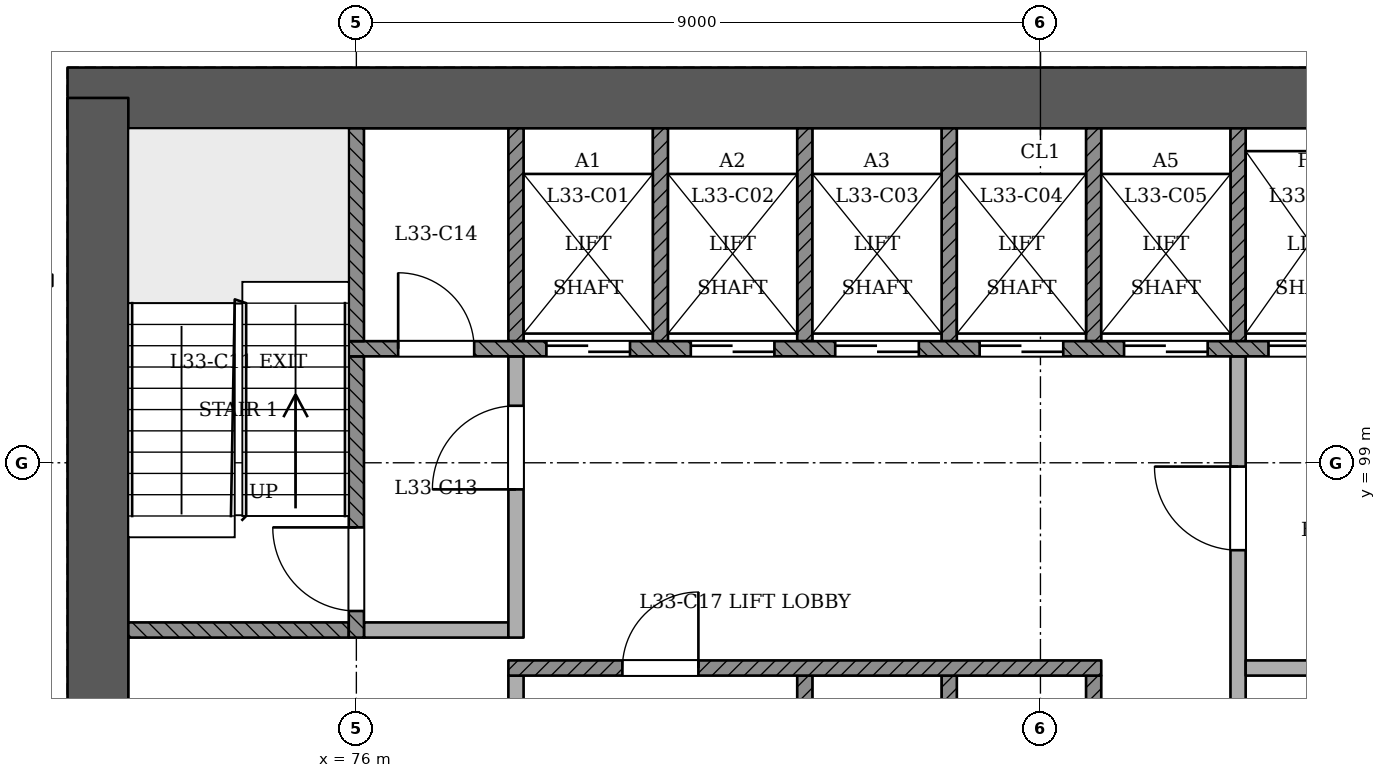
"""IFC4 building model, lengths in metres.
Left out: names, types, materials, properties, quantities, classifications, styles, units other than length and angle.
Written with IfcOpenShell. Run it as: python <this file> out.ifc"""

import sys

from ifc_helpers import new_model, si_unit, direction, frame, frame_2d, origin, place, context, subcontext, project, spatial, rectangle, extrude, element, fill, save


model = new_model("IFC4")
c1 = context("Model", 3, precision=1e-05, world=origin(), true_north=direction((0.0, 1.0)))
c2 = subcontext(c1, "Body", "Model", "MODEL_VIEW")
j1 = project(units=[si_unit("LENGTHUNIT", "METRE"), si_unit("PLANEANGLEUNIT", "RADIAN")], contexts=[c1])
p1 = place(None, origin())
s1 = spatial("IfcSite", under=j1, at=p1, CompositionType="ELEMENT")
p2 = place(p1, origin())
s2 = spatial("IfcBuilding", under=s1, at=p2, CompositionType="ELEMENT")
p3 = place(p2, frame((0.0, 0.0, 131.4)))
s3 = spatial("IfcBuildingStorey", under=s2, at=p3, CompositionType="ELEMENT", Elevation=131.4)
p4 = place(p3, frame((97.4, 103.8, 0.0), z_axis=(0.0, 0.0, 1.0), x_axis=(-1.0, 0.0, 0.0)))
e1 = element("IfcWall", 1, at=p4, inside=s3, PredefinedType="SHEAR", context=c2, shape_type="SweptSolid", body=[
    extrude(rectangle(XDim=25.2, YDim=0.8, at=frame_2d((12.6, 0.0))), origin(), (0.0, 0.0, 1.0), 3.6),
])
p5 = place(p3, frame((72.6, 103.8, 0.0), z_axis=(0.0, 0.0, 1.0), x_axis=(0.0, -1.0, 0.0)))
e2 = element("IfcWall", 2, at=p5, inside=s3, PredefinedType="SHEAR", context=c2, shape_type="SweptSolid", body=[
    extrude(rectangle(XDim=11.2, YDim=0.8, at=frame_2d((5.6, 0.0))), origin(), (0.0, 0.0, 1.0), 3.6),
])
p6 = place(p3, frame((64.656, 98.273, 0.0), z_axis=(0.0, 0.0, 1.0), x_axis=(0.500001784794, -0.866024373331, 0.0)))
e3 = element("IfcWall", 3, at=p6, inside=s3, PredefinedType="PARTITIONING", context=c2, shape_type="SweptSolid", body=[
    extrude(rectangle(XDim=40.426, YDim=0.15, at=frame_2d((20.213, 0.0))), origin(), (0.0, 0.0, 1.0), 2.75),
])
p7 = place(p6, frame((0.2, 0.0, 0.0)))
e4 = element("IfcOpeningElement", 4, at=p7, cuts=e3, PredefinedType="OPENING", context=c2, shape_type="SweptSolid", body=[
    extrude(rectangle(XDim=1.2, YDim=2.1, at=frame_2d((0.6, 1.05))), frame((0.0, 0.085, 0.0), z_axis=(0.0, -1.0, 0.0), x_axis=(1.0, 0.0, 0.0)), (0.0, 0.0, 1.0), 0.171),
])
p8 = place(p6, frame((2.933, 0.0, 0.0)))
e5 = element("IfcOpeningElement", 5, at=p8, cuts=e3, PredefinedType="OPENING", context=c2, shape_type="SweptSolid", body=[
    extrude(rectangle(XDim=1.0, YDim=2.1, at=frame_2d((0.5, 1.05))), frame((0.0, 0.085, 0.0), z_axis=(0.0, -1.0, 0.0), x_axis=(1.0, 0.0, 0.0)), (0.0, 0.0, 1.0), 0.171),
])
p9 = place(p6, frame((9.608, 0.0, 0.0)))
e6 = element("IfcOpeningElement", 6, at=p9, cuts=e3, PredefinedType="OPENING", context=c2, shape_type="SweptSolid", body=[
    extrude(rectangle(XDim=1.0, YDim=2.1, at=frame_2d((0.5, 1.05))), frame((0.0, 0.085, 0.0), z_axis=(0.0, -1.0, 0.0), x_axis=(1.0, 0.0, 0.0)), (0.0, 0.0, 1.0), 0.171),
])
p10 = place(p6, frame((11.818, 0.0, 0.0)))
e7 = element("IfcOpeningElement", 7, at=p10, cuts=e3, PredefinedType="OPENING", context=c2, shape_type="SweptSolid", body=[
    extrude(rectangle(XDim=1.0, YDim=2.1, at=frame_2d((0.5, 1.05))), frame((0.0, 0.085, 0.0), z_axis=(0.0, -1.0, 0.0), x_axis=(1.0, 0.0, 0.0)), (0.0, 0.0, 1.0), 0.171),
])
p11 = place(p6, frame((18.493, 0.0, 0.0)))
e8 = element("IfcOpeningElement", 8, at=p11, cuts=e3, PredefinedType="OPENING", context=c2, shape_type="SweptSolid", body=[
    extrude(rectangle(XDim=1.0, YDim=2.1, at=frame_2d((0.5, 1.05))), frame((0.0, 0.085, 0.0), z_axis=(0.0, -1.0, 0.0), x_axis=(1.0, 0.0, 0.0)), (0.0, 0.0, 1.0), 0.171),
])
p12 = place(p6, frame((21.963, 0.0, 0.0)))
e9 = element("IfcOpeningElement", 9, at=p12, cuts=e3, PredefinedType="OPENING", context=c2, shape_type="SweptSolid", body=[
    extrude(rectangle(XDim=1.0, YDim=2.1, at=frame_2d((0.5, 1.05))), frame((0.0, 0.085, 0.0), z_axis=(0.0, -1.0, 0.0), x_axis=(1.0, 0.0, 0.0)), (0.0, 0.0, 1.0), 0.171),
])
p13 = place(p6, frame((27.493, 0.0, 0.0)))
e10 = element("IfcOpeningElement", 10, at=p13, cuts=e3, PredefinedType="OPENING", context=c2, shape_type="SweptSolid", body=[
    extrude(rectangle(XDim=1.0, YDim=2.1, at=frame_2d((0.5, 1.05))), frame((0.0, 0.085, 0.0), z_axis=(0.0, -1.0, 0.0), x_axis=(1.0, 0.0, 0.0)), (0.0, 0.0, 1.0), 0.171),
])
p14 = place(p6, frame((30.963, 0.0, 0.0)))
e11 = element("IfcOpeningElement", 11, at=p14, cuts=e3, PredefinedType="OPENING", context=c2, shape_type="SweptSolid", body=[
    extrude(rectangle(XDim=1.0, YDim=2.1, at=frame_2d((0.5, 1.05))), frame((0.0, 0.085, 0.0), z_axis=(0.0, -1.0, 0.0), x_axis=(1.0, 0.0, 0.0)), (0.0, 0.0, 1.0), 0.171),
])
p15 = place(p6, frame((36.493, 0.0, 0.0)))
e12 = element("IfcOpeningElement", 12, at=p15, cuts=e3, PredefinedType="OPENING", context=c2, shape_type="SweptSolid", body=[
    extrude(rectangle(XDim=1.0, YDim=2.1, at=frame_2d((0.5, 1.05))), frame((0.0, 0.085, 0.0), z_axis=(0.0, -1.0, 0.0), x_axis=(1.0, 0.0, 0.0)), (0.0, 0.0, 1.0), 0.171),
])
p16 = place(p6, frame((39.101, 0.0, 0.0)))
e13 = element("IfcOpeningElement", 13, at=p16, cuts=e3, PredefinedType="OPENING", context=c2, shape_type="SweptSolid", body=[
    extrude(rectangle(XDim=1.0, YDim=2.1, at=frame_2d((0.5, 1.05))), frame((0.0, 0.085, 0.0), z_axis=(0.0, -1.0, 0.0), x_axis=(1.0, 0.0, 0.0)), (0.0, 0.0, 1.0), 0.171),
])
p17 = place(p3, frame((78.1, 93.4, 0.0), z_axis=(0.0, 0.0, 1.0), x_axis=(0.0, 1.0, 0.0)))
e14 = element("IfcWall", 14, at=p17, inside=s3, PredefinedType="PARTITIONING", context=c2, shape_type="SweptSolid", body=[
    extrude(rectangle(XDim=2.8, YDim=0.2, at=frame_2d((1.4, 0.0))), origin(), (0.0, 0.0, 1.0), 3.15),
])
for number, where, z_axis, x_axis in (
    (15, (81.9, 93.4, 0.0), (0.0, 0.0, 1.0), (0.0, 1.0, 0.0)),
    (16, (83.8, 93.4, 0.0), (0.0, 0.0, 1.0), (0.0, 1.0, 0.0)),
    (17, (85.7, 93.4, 0.0), (0.0, 0.0, 1.0), (0.0, 1.0, 0.0)),
):
    element("IfcWall", number, at=place(p3, frame(where, z_axis=z_axis, x_axis=x_axis)), inside=s3, PredefinedType="SOLIDWALL", context=c2, shape_type="SweptSolid", body=[
        extrude(rectangle(XDim=2.8, YDim=0.2, at=frame_2d((1.4, 0.0))), origin(), (0.0, 0.0, 1.0), 3.15),
    ])
p18 = place(p3, frame((87.6, 93.4, 0.0), z_axis=(0.0, 0.0, 1.0), x_axis=(0.0, 1.0, 0.0)))
e18 = element("IfcWall", 18, at=p18, inside=s3, PredefinedType="PARTITIONING", context=c2, shape_type="SweptSolid", body=[
    extrude(rectangle(XDim=7.0, YDim=0.2, at=frame_2d((3.5, 0.0))), origin(), (0.0, 0.0, 1.0), 3.15),
])
p19 = place(p18, frame((4.45, 0.0, 0.0)))
e19 = element("IfcOpeningElement", 19, at=p19, cuts=e18, PredefinedType="OPENING", context=c2, shape_type="SweptSolid", body=[
    extrude(rectangle(XDim=1.1, YDim=2.1, at=frame_2d((0.55, 1.05))), frame((0.0, 0.11, 0.0), z_axis=(0.0, -1.0, 0.0), x_axis=(1.0, 0.0, 0.0)), (0.0, 0.0, 1.0), 0.221),
])
p20 = place(p3, frame((78.0, 96.3, 0.0), z_axis=(0.0, 0.0, 1.0), x_axis=(1.0, 0.0, 0.0)))
e20 = element("IfcWall", 20, at=p20, inside=s3, PredefinedType="SOLIDWALL", context=c2, shape_type="SweptSolid", body=[
    extrude(rectangle(XDim=7.8, YDim=0.2, at=frame_2d((3.9, 0.0))), origin(), (0.0, 0.0, 1.0), 3.15),
])
p21 = place(p20, frame((1.5, 0.0, 0.0)))
e21 = element("IfcOpeningElement", 21, at=p21, cuts=e20, PredefinedType="OPENING", context=c2, shape_type="SweptSolid", body=[
    extrude(rectangle(XDim=1.0, YDim=2.1, at=frame_2d((0.5, 1.05))), frame((0.0, 0.11, 0.0), z_axis=(0.0, -1.0, 0.0), x_axis=(1.0, 0.0, 0.0)), (0.0, 0.0, 1.0), 0.221),
])
p22 = place(p3, frame((87.7, 96.3, 0.0), z_axis=(0.0, 0.0, 1.0), x_axis=(1.0, 0.0, 0.0)))
e22 = element("IfcWall", 22, at=p22, inside=s3, PredefinedType="PARTITIONING", context=c2, shape_type="SweptSolid", body=[
    extrude(rectangle(XDim=3.6, YDim=0.2, at=frame_2d((1.8, 0.0))), origin(), (0.0, 0.0, 1.0), 3.15),
])
p23 = place(p3, frame((73.0, 96.8, 0.0), z_axis=(0.0, 0.0, 1.0), x_axis=(1.0, 0.0, 0.0)))
e23 = element("IfcWall", 23, at=p23, inside=s3, PredefinedType="SOLIDWALL", context=c2, shape_type="SweptSolid", body=[
    extrude(rectangle(XDim=2.9, YDim=0.2, at=frame_2d((1.45, 0.0))), origin(), (0.0, 0.0, 1.0), 3.15),
])
p24 = place(p3, frame((76.0, 96.7, 0.0), z_axis=(0.0, 0.0, 1.0), x_axis=(0.0, 1.0, 0.0)))
e24 = element("IfcWall", 24, at=p24, inside=s3, PredefinedType="SOLIDWALL", context=c2, shape_type="SweptSolid", body=[
    extrude(rectangle(XDim=3.7, YDim=0.2, at=frame_2d((1.85, 0.0))), origin(), (0.0, 0.0, 1.0), 3.15),
])
p25 = place(p24, frame((0.35, 0.0, 0.0)))
e25 = element("IfcOpeningElement", 25, at=p25, cuts=e24, PredefinedType="OPENING", context=c2, shape_type="SweptSolid", body=[
    extrude(rectangle(XDim=1.1, YDim=2.1, at=frame_2d((0.55, 1.05))), frame((0.0, 0.11, 0.0), z_axis=(0.0, -1.0, 0.0), x_axis=(1.0, 0.0, 0.0)), (0.0, 0.0, 1.0), 0.221),
])
p26 = place(p3, frame((76.1, 96.8, 0.0), z_axis=(0.0, 0.0, 1.0), x_axis=(1.0, 0.0, 0.0)))
e26 = element("IfcWall", 26, at=p26, inside=s3, PredefinedType="PARTITIONING", context=c2, shape_type="SweptSolid", body=[
    extrude(rectangle(XDim=1.9, YDim=0.2, at=frame_2d((0.95, 0.0))), origin(), (0.0, 0.0, 1.0), 3.15),
])
p27 = place(p3, frame((78.1, 96.7, 0.0), z_axis=(0.0, 0.0, 1.0), x_axis=(0.0, 1.0, 0.0)))
e27 = element("IfcWall", 27, at=p27, inside=s3, PredefinedType="PARTITIONING", context=c2, shape_type="SweptSolid", body=[
    extrude(rectangle(XDim=3.7, YDim=0.2, at=frame_2d((1.85, 0.0))), origin(), (0.0, 0.0, 1.0), 3.15),
])
p28 = place(p27, frame((1.95, 0.0, 0.0)))
e28 = element("IfcOpeningElement", 28, at=p28, cuts=e27, PredefinedType="OPENING", context=c2, shape_type="SweptSolid", body=[
    extrude(rectangle(XDim=1.1, YDim=2.1, at=frame_2d((0.55, 1.05))), frame((0.0, 0.11, 0.0), z_axis=(0.0, -1.0, 0.0), x_axis=(1.0, 0.0, 0.0)), (0.0, 0.0, 1.0), 0.221),
])
p29 = place(p3, frame((75.9, 100.5, 0.0), z_axis=(0.0, 0.0, 1.0), x_axis=(1.0, 0.0, 0.0)))
e29 = element("IfcWall", 29, at=p29, inside=s3, PredefinedType="SOLIDWALL", context=c2, shape_type="SweptSolid", body=[
    extrude(rectangle(XDim=18.2, YDim=0.2, at=frame_2d((9.1, 0.0))), origin(), (0.0, 0.0, 1.0), 3.15),
])
p30 = place(p29, frame((2.6, 0.0, 0.0)))
e30 = element("IfcOpeningElement", 30, at=p30, cuts=e29, PredefinedType="OPENING", context=c2, shape_type="SweptSolid", body=[
    extrude(rectangle(XDim=1.1, YDim=2.1, at=frame_2d((0.55, 1.05))), frame((0.0, 0.11, 0.0), z_axis=(0.0, -1.0, 0.0), x_axis=(1.0, 0.0, 0.0)), (0.0, 0.0, 1.0), 0.221),
])
p31 = place(p29, frame((4.5, 0.0, 0.0)))
e31 = element("IfcOpeningElement", 31, at=p31, cuts=e29, PredefinedType="OPENING", context=c2, shape_type="SweptSolid", body=[
    extrude(rectangle(XDim=1.1, YDim=2.1, at=frame_2d((0.55, 1.05))), frame((0.0, 0.11, 0.0), z_axis=(0.0, -1.0, 0.0), x_axis=(1.0, 0.0, 0.0)), (0.0, 0.0, 1.0), 0.221),
])
p32 = place(p29, frame((6.4, 0.0, 0.0)))
e32 = element("IfcOpeningElement", 32, at=p32, cuts=e29, PredefinedType="OPENING", context=c2, shape_type="SweptSolid", body=[
    extrude(rectangle(XDim=1.1, YDim=2.1, at=frame_2d((0.55, 1.05))), frame((0.0, 0.11, 0.0), z_axis=(0.0, -1.0, 0.0), x_axis=(1.0, 0.0, 0.0)), (0.0, 0.0, 1.0), 0.221),
])
p33 = place(p29, frame((8.3, 0.0, 0.0)))
e33 = element("IfcOpeningElement", 33, at=p33, cuts=e29, PredefinedType="OPENING", context=c2, shape_type="SweptSolid", body=[
    extrude(rectangle(XDim=1.1, YDim=2.1, at=frame_2d((0.55, 1.05))), frame((0.0, 0.11, 0.0), z_axis=(0.0, -1.0, 0.0), x_axis=(1.0, 0.0, 0.0)), (0.0, 0.0, 1.0), 0.221),
])
p34 = place(p29, frame((10.2, 0.0, 0.0)))
e34 = element("IfcOpeningElement", 34, at=p34, cuts=e29, PredefinedType="OPENING", context=c2, shape_type="SweptSolid", body=[
    extrude(rectangle(XDim=1.1, YDim=2.1, at=frame_2d((0.55, 1.05))), frame((0.0, 0.11, 0.0), z_axis=(0.0, -1.0, 0.0), x_axis=(1.0, 0.0, 0.0)), (0.0, 0.0, 1.0), 0.221),
])
p35 = place(p29, frame((12.1, 0.0, 0.0)))
e35 = element("IfcOpeningElement", 35, at=p35, cuts=e29, PredefinedType="OPENING", context=c2, shape_type="SweptSolid", body=[
    extrude(rectangle(XDim=1.1, YDim=2.1, at=frame_2d((0.55, 1.05))), frame((0.0, 0.11, 0.0), z_axis=(0.0, -1.0, 0.0), x_axis=(1.0, 0.0, 0.0)), (0.0, 0.0, 1.0), 0.221),
])
p36 = place(p29, frame((14.0, 0.0, 0.0)))
e36 = element("IfcOpeningElement", 36, at=p36, cuts=e29, PredefinedType="OPENING", context=c2, shape_type="SweptSolid", body=[
    extrude(rectangle(XDim=1.1, YDim=2.1, at=frame_2d((0.55, 1.05))), frame((0.0, 0.11, 0.0), z_axis=(0.0, -1.0, 0.0), x_axis=(1.0, 0.0, 0.0)), (0.0, 0.0, 1.0), 0.221),
])
p37 = place(p29, frame((0.65, 0.0, 0.0)))
e37 = element("IfcOpeningElement", 37, at=p37, cuts=e29, PredefinedType="OPENING", context=c2, shape_type="SweptSolid", body=[
    extrude(rectangle(XDim=1.0, YDim=2.1, at=frame_2d((0.5, 1.05))), frame((0.0, 0.11, 0.0), z_axis=(0.0, -1.0, 0.0), x_axis=(1.0, 0.0, 0.0)), (0.0, 0.0, 1.0), 0.221),
])
p38 = place(p29, frame((16.3, 0.0, 0.0)))
e38 = element("IfcOpeningElement", 38, at=p38, cuts=e29, PredefinedType="OPENING", context=c2, shape_type="SweptSolid", body=[
    extrude(rectangle(XDim=1.0, YDim=2.1, at=frame_2d((0.5, 1.05))), frame((0.0, 0.11, 0.0), z_axis=(0.0, -1.0, 0.0), x_axis=(1.0, 0.0, 0.0)), (0.0, 0.0, 1.0), 0.221),
])
for number, where, z_axis, x_axis in (
    (39, (76.0, 100.6, 0.0), (0.0, 0.0, 1.0), (0.0, 1.0, 0.0)),
    (40, (78.1, 100.6, 0.0), (0.0, 0.0, 1.0), (0.0, 1.0, 0.0)),
    (41, (80.0, 100.6, 0.0), (0.0, 0.0, 1.0), (0.0, 1.0, 0.0)),
    (42, (81.9, 100.6, 0.0), (0.0, 0.0, 1.0), (0.0, 1.0, 0.0)),
    (43, (83.8, 100.6, 0.0), (0.0, 0.0, 1.0), (0.0, 1.0, 0.0)),
    (44, (85.7, 100.6, 0.0), (0.0, 0.0, 1.0), (0.0, 1.0, 0.0)),
    (45, (87.6, 100.6, 0.0), (0.0, 0.0, 1.0), (0.0, 1.0, 0.0)),
):
    element("IfcWall", number, at=place(p3, frame(where, z_axis=z_axis, x_axis=x_axis)), inside=s3, PredefinedType="SOLIDWALL", context=c2, shape_type="SweptSolid", body=[
        extrude(rectangle(XDim=2.8, YDim=0.2, at=frame_2d((1.4, 0.0))), origin(), (0.0, 0.0, 1.0), 3.15),
    ])
p39 = place(p30, origin())
e46 = element("IfcDoor", 46, at=p39, inside=s3, OperationType="SLIDING_TO_RIGHT", PredefinedType="NOTDEFINED", context=c2, shape_type="SweptSolid", body=[
    extrude(rectangle(XDim=1.1, YDim=2.1, at=frame_2d((0.55, 1.05))), frame((0.0, 0.025, 0.0), z_axis=(0.0, -1.0, 0.0), x_axis=(1.0, 0.0, 0.0)), (0.0, 0.0, 1.0), 0.05),
])
fill(e30, e46)
p40 = place(p31, origin())
e47 = element("IfcDoor", 47, at=p40, inside=s3, OperationType="SLIDING_TO_LEFT", PredefinedType="NOTDEFINED", context=c2, shape_type="SweptSolid", body=[
    extrude(rectangle(XDim=1.1, YDim=2.1, at=frame_2d((0.55, 1.05))), frame((0.0, 0.025, 0.0), z_axis=(0.0, -1.0, 0.0), x_axis=(1.0, 0.0, 0.0)), (0.0, 0.0, 1.0), 0.05),
])
fill(e31, e47)
p41 = place(p32, origin())
e48 = element("IfcDoor", 48, at=p41, inside=s3, OperationType="SLIDING_TO_RIGHT", PredefinedType="NOTDEFINED", context=c2, shape_type="SweptSolid", body=[
    extrude(rectangle(XDim=1.1, YDim=2.1, at=frame_2d((0.55, 1.05))), frame((0.0, 0.025, 0.0), z_axis=(0.0, -1.0, 0.0), x_axis=(1.0, 0.0, 0.0)), (0.0, 0.0, 1.0), 0.05),
])
fill(e32, e48)
p42 = place(p33, origin())
e49 = element("IfcDoor", 49, at=p42, inside=s3, OperationType="SLIDING_TO_LEFT", PredefinedType="NOTDEFINED", context=c2, shape_type="SweptSolid", body=[
    extrude(rectangle(XDim=1.1, YDim=2.1, at=frame_2d((0.55, 1.05))), frame((0.0, 0.025, 0.0), z_axis=(0.0, -1.0, 0.0), x_axis=(1.0, 0.0, 0.0)), (0.0, 0.0, 1.0), 0.05),
])
fill(e33, e49)
p43 = place(p34, origin())
e50 = element("IfcDoor", 50, at=p43, inside=s3, OperationType="SLIDING_TO_RIGHT", PredefinedType="NOTDEFINED", context=c2, shape_type="SweptSolid", body=[
    extrude(rectangle(XDim=1.1, YDim=2.1, at=frame_2d((0.55, 1.05))), frame((0.0, 0.025, 0.0), z_axis=(0.0, -1.0, 0.0), x_axis=(1.0, 0.0, 0.0)), (0.0, 0.0, 1.0), 0.05),
])
fill(e34, e50)
p44 = place(p35, origin())
e51 = element("IfcDoor", 51, at=p44, inside=s3, OperationType="SLIDING_TO_RIGHT", PredefinedType="NOTDEFINED", context=c2, shape_type="SweptSolid", body=[
    extrude(rectangle(XDim=1.1, YDim=2.1, at=frame_2d((0.55, 1.05))), frame((0.0, 0.025, 0.0), z_axis=(0.0, -1.0, 0.0), x_axis=(1.0, 0.0, 0.0)), (0.0, 0.0, 1.0), 0.05),
])
fill(e35, e51)
p45 = place(p25, origin())
e52 = element("IfcDoor", 52, at=p45, inside=s3, OperationType="SINGLE_SWING_RIGHT", PredefinedType="NOTDEFINED", context=c2, shape_type="SweptSolid", body=[
    extrude(rectangle(XDim=1.1, YDim=2.1, at=frame_2d((0.55, 1.05))), frame((0.0, 0.025, 0.0), z_axis=(0.0, -1.0, 0.0), x_axis=(1.0, 0.0, 0.0)), (0.0, 0.0, 1.0), 0.05),
])
fill(e25, e52)
p46 = place(p28, origin())
e53 = element("IfcDoor", 53, at=p46, inside=s3, OperationType="SINGLE_SWING_LEFT", PredefinedType="NOTDEFINED", context=c2, shape_type="SweptSolid", body=[
    extrude(rectangle(XDim=1.1, YDim=2.1, at=frame_2d((0.55, 1.05))), frame((0.0, 0.025, 0.0), z_axis=(0.0, -1.0, 0.0), x_axis=(1.0, 0.0, 0.0)), (0.0, 0.0, 1.0), 0.05),
])
fill(e28, e53)
p47 = place(p19, origin())
e54 = element("IfcDoor", 54, at=p47, inside=s3, OperationType="SINGLE_SWING_RIGHT", PredefinedType="NOTDEFINED", context=c2, shape_type="SweptSolid", body=[
    extrude(rectangle(XDim=1.1, YDim=2.1, at=frame_2d((0.55, 1.05))), frame((0.0, 0.025, 0.0), z_axis=(0.0, -1.0, 0.0), x_axis=(1.0, 0.0, 0.0)), (0.0, 0.0, 1.0), 0.05),
])
fill(e19, e54)
p48 = place(p37, origin())
e55 = element("IfcDoor", 55, at=p48, inside=s3, OperationType="SINGLE_SWING_LEFT", PredefinedType="NOTDEFINED", context=c2, shape_type="SweptSolid", body=[
    extrude(rectangle(XDim=1.0, YDim=2.1, at=frame_2d((0.5, 1.05))), frame((0.0, 0.025, 0.0), z_axis=(0.0, -1.0, 0.0), x_axis=(1.0, 0.0, 0.0)), (0.0, 0.0, 1.0), 0.05),
])
fill(e37, e55)
p49 = place(p21, origin())
e56 = element("IfcDoor", 56, at=p49, inside=s3, OperationType="SINGLE_SWING_RIGHT", PredefinedType="NOTDEFINED", context=c2, shape_type="SweptSolid", body=[
    extrude(rectangle(XDim=1.0, YDim=2.1, at=frame_2d((0.5, 1.05))), frame((0.0, 0.025, 0.0), z_axis=(0.0, -1.0, 0.0), x_axis=(1.0, 0.0, 0.0)), (0.0, 0.0, 1.0), 0.05),
])
fill(e21, e56)
save(model, sys.argv[1])
